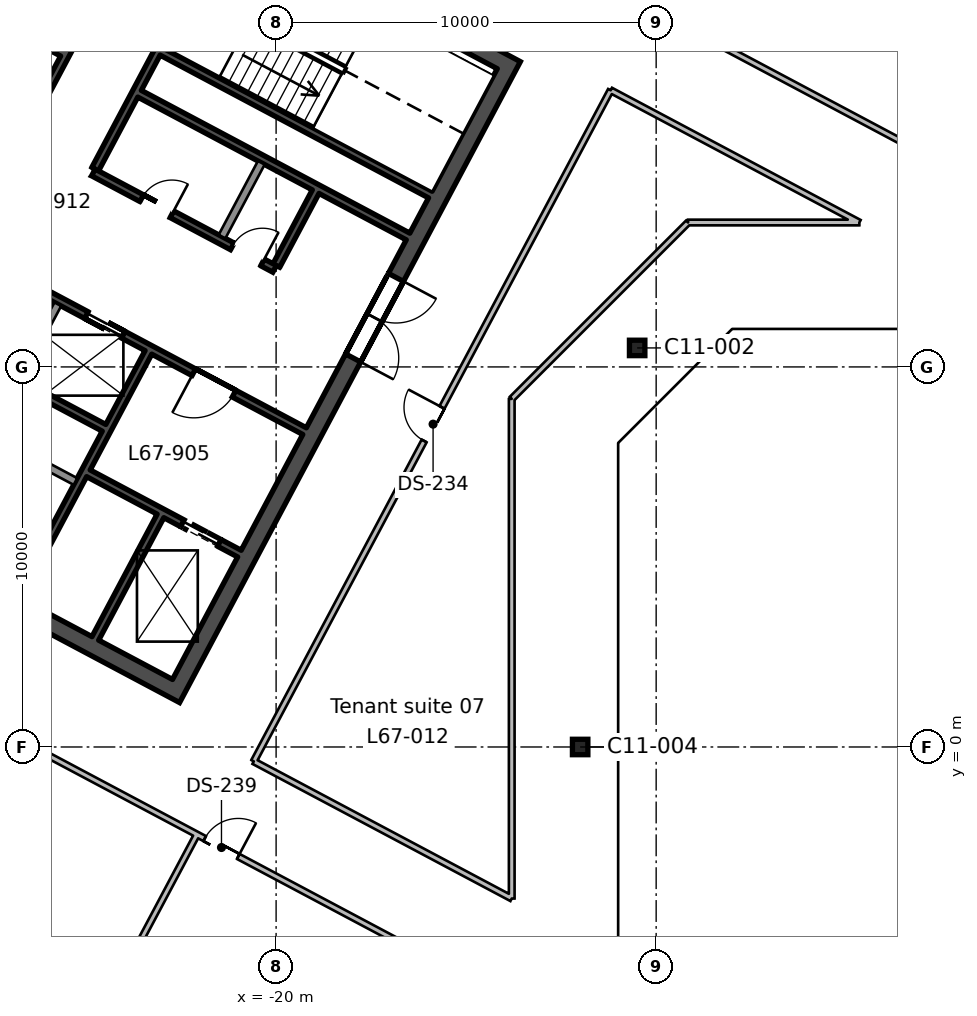
"""IFC4 building model, lengths in metres.
Left out: names, types, materials, properties, quantities, classifications, styles, units other than length and angle.
Written with IfcOpenShell. Run it as: python <this file> out.ifc"""

import sys

from ifc_helpers import new_model, si_unit, direction, frame, frame_2d, origin, origin_2d, place, context, subcontext, project, spatial, rectangle, hollow_rectangle, extrude, element, fill, save


model = new_model("IFC4")
c1 = context("Model", 3, precision=1e-05, world=origin(), true_north=direction((0.0, 1.0)))
c2 = subcontext(c1, "Body", "Model", "MODEL_VIEW")
j1 = project(units=[si_unit("LENGTHUNIT", "METRE"), si_unit("PLANEANGLEUNIT", "RADIAN")], contexts=[c1])
p1 = place(None, origin())
s1 = spatial("IfcSite", under=j1, at=p1, CompositionType="ELEMENT")
p2 = place(p1, origin())
s2 = spatial("IfcBuilding", under=s1, at=p2, CompositionType="ELEMENT")
p3 = place(p2, frame((0.0, 0.0, 297.0)))
s3 = spatial("IfcBuildingStorey", under=s2, at=p3, CompositionType="ELEMENT", Elevation=297.0)
for number, where, z_axis, x_axis in (
    (1, (-12.0, 0.0, 0.0), (0.0, 0.0, 1.0), (1.0, 0.0, 0.0)),
    (2, (-10.5, 10.5, 0.0), (0.0, 0.0, 1.0), (1.0, 0.0, 0.0)),
):
    element("IfcColumn", number, at=place(p3, frame(where, z_axis=z_axis, x_axis=x_axis)), inside=s3, PredefinedType="COLUMN", context=c2, shape_type="SweptSolid", body=[
        extrude(hollow_rectangle(XDim=0.406, YDim=0.406, WallThickness=0.009, InnerFilletRadius=0.004, OuterFilletRadius=0.013, at=origin_2d()), origin(), (0.0, 0.0, 1.0), 3.9),
    ])
p4 = place(p3, frame((-13.771, 18.138, 0.0), z_axis=(0.0, 0.0, 1.0), x_axis=(-0.469467968382, -0.882949504028, 0.0)))
e3 = element("IfcWall", 3, at=p4, inside=s3, PredefinedType="SHEAR", context=c2, shape_type="SweptSolid", body=[
    extrude(rectangle(XDim=19.1, YDim=0.45, at=frame_2d((9.55, 0.0))), origin(), (0.0, 0.0, 1.0), 3.9),
])
p5 = place(p4, frame((6.55, 0.0, 0.0)))
e4 = element("IfcOpeningElement", 4, at=p5, cuts=e3, PredefinedType="OPENING", context=c2, shape_type="SweptSolid", body=[
    extrude(rectangle(XDim=2.4, YDim=2.4, at=frame_2d((1.2, 1.2))), frame((0.0, 0.235, 0.0), z_axis=(0.0, -1.0, 0.0), x_axis=(1.0, 0.0, 0.0)), (0.0, 0.0, 1.0), 0.47),
])
p6 = place(p3, frame((-14.076, 18.045, 0.0), z_axis=(0.0, 0.0, 1.0), x_axis=(-0.882947755831, 0.46947125628, 0.0)))
e5 = element("IfcWall", 5, at=p6, inside=s3, PredefinedType="SHEAR", context=c2, shape_type="SweptSolid", body=[
    extrude(rectangle(XDim=20.2, YDim=0.45, at=frame_2d((10.1, 0.0))), origin(), (0.0, 0.0, 1.0), 3.9),
])
p7 = place(p3, frame((-22.832, 1.578, 0.0), z_axis=(0.0, 0.0, 1.0), x_axis=(-0.88294509198, 0.469476266226, 0.0)))
e6 = element("IfcWall", 6, at=p7, inside=s3, PredefinedType="SHEAR", context=c2, shape_type="SweptSolid", body=[
    extrude(rectangle(XDim=20.2, YDim=0.45, at=frame_2d((10.1, 0.0))), origin(), (0.0, 0.0, 1.0), 3.9),
])
p8 = place(p3, frame((-23.043, 6.08, 0.0), z_axis=(0.0, 0.0, 1.0), x_axis=(-0.469494272526, -0.882935517501, 0.0)))
e7 = element("IfcWall", 7, at=p8, inside=s3, PredefinedType="SHEAR", context=c2, shape_type="SweptSolid", body=[
    extrude(rectangle(XDim=3.65, YDim=0.2, at=frame_2d((1.825, 0.0))), origin(), (0.0, 0.0, 1.0), 3.9),
])
p9 = place(p3, frame((-18.96, 14.611, 0.0), z_axis=(0.0, 0.0, 1.0), x_axis=(-0.4694473164, -0.882960484464, 0.0)))
e8 = element("IfcWall", 8, at=p9, inside=s3, PredefinedType="SHEAR", context=c2, shape_type="SweptSolid", body=[
    extrude(rectangle(XDim=2.2, YDim=0.2, at=frame_2d((1.1, 0.0))), origin(), (0.0, 0.0, 1.0), 3.9),
])
p10 = place(p3, frame((-20.39, 15.372, 0.0), z_axis=(0.0, 0.0, 1.0), x_axis=(-0.4694473164, -0.882960484464, 0.0)))
e9 = element("IfcWall", 9, at=p10, inside=s3, PredefinedType="SOLIDWALL", context=c2, shape_type="SweptSolid", body=[
    extrude(rectangle(XDim=2.2, YDim=0.2, at=frame_2d((1.1, 0.0))), origin(), (0.0, 0.0, 1.0), 3.9),
])
p11 = place(p3, frame((-23.36, 10.382, 0.0), z_axis=(0.0, 0.0, 1.0), x_axis=(-0.469480409012, -0.88294288918, 0.0)))
e10 = element("IfcWall", 10, at=p11, inside=s3, PredefinedType="SHEAR", context=c2, shape_type="SweptSolid", body=[
    extrude(rectangle(XDim=7.3, YDim=0.2, at=frame_2d((3.65, 0.0))), origin(), (0.0, 0.0, 1.0), 3.9),
])
p12 = place(p3, frame((-25.744, 11.65, 0.0), z_axis=(0.0, 0.0, 1.0), x_axis=(-0.469487830541, -0.882938942948, 0.0)))
e11 = element("IfcWall", 11, at=p12, inside=s3, PredefinedType="SOLIDWALL", context=c2, shape_type="SweptSolid", body=[
    extrude(rectangle(XDim=2.2, YDim=0.2, at=frame_2d((1.1, 0.0))), origin(), (0.0, 0.0, 1.0), 3.9),
])
p13 = place(p3, frame((-21.333, 21.649, 0.0), z_axis=(0.0, 0.0, 1.0), x_axis=(-0.469494272526, -0.882935517501, 0.0)))
e12 = element("IfcWall", 12, at=p13, inside=s3, PredefinedType="SHEAR", context=c2, shape_type="SweptSolid", body=[
    extrude(rectangle(XDim=7.3, YDim=0.2, at=frame_2d((3.65, 0.0))), origin(), (0.0, 0.0, 1.0), 3.9),
])
p14 = place(p13, frame((1.3, 0.0, 0.0)))
e13 = element("IfcOpeningElement", 13, at=p14, cuts=e12, PredefinedType="OPENING", context=c2, shape_type="SweptSolid", body=[
    extrude(rectangle(XDim=1.2, YDim=2.1, at=frame_2d((0.6, 1.05))), frame((0.0, 0.11, 0.0), z_axis=(0.0, -1.0, 0.0), x_axis=(1.0, 0.0, 0.0)), (0.0, 0.0, 1.0), 0.22),
])
p15 = place(p3, frame((-23.188, 22.635, 0.0), z_axis=(0.0, 0.0, 1.0), x_axis=(-0.469454336211, -0.882956752176, 0.0)))
e14 = element("IfcWall", 14, at=p15, inside=s3, PredefinedType="SHEAR", context=c2, shape_type="SweptSolid", body=[
    extrude(rectangle(XDim=7.3, YDim=0.2, at=frame_2d((3.65, 0.0))), origin(), (0.0, 0.0, 1.0), 3.9),
])
p16 = place(p15, frame((0.4, 0.0, 0.0)))
e15 = element("IfcOpeningElement", 15, at=p16, cuts=e14, PredefinedType="OPENING", context=c2, shape_type="SweptSolid", body=[
    extrude(rectangle(XDim=0.9, YDim=2.1, at=frame_2d((0.45, 1.05))), frame((0.0, 0.11, 0.0), z_axis=(0.0, -1.0, 0.0), x_axis=(1.0, 0.0, 0.0)), (0.0, 0.0, 1.0), 0.22),
])
p17 = place(p15, frame((2.1, 0.0, 0.0)))
e16 = element("IfcOpeningElement", 16, at=p17, cuts=e14, PredefinedType="OPENING", context=c2, shape_type="SweptSolid", body=[
    extrude(rectangle(XDim=0.9, YDim=2.1, at=frame_2d((0.45, 1.05))), frame((0.0, 0.11, 0.0), z_axis=(0.0, -1.0, 0.0), x_axis=(1.0, 0.0, 0.0)), (0.0, 0.0, 1.0), 0.22),
])
p18 = place(p15, frame((3.75, 0.0, 0.0)))
e17 = element("IfcOpeningElement", 17, at=p18, cuts=e14, PredefinedType="OPENING", context=c2, shape_type="SweptSolid", body=[
    extrude(rectangle(XDim=0.9, YDim=2.1, at=frame_2d((0.45, 1.05))), frame((0.0, 0.11, 0.0), z_axis=(0.0, -1.0, 0.0), x_axis=(1.0, 0.0, 0.0)), (0.0, 0.0, 1.0), 0.22),
])
p19 = place(p3, frame((-15.942, 14.536, 0.0), z_axis=(0.0, 0.0, 1.0), x_axis=(-0.882946947542, 0.469472776449, 0.0)))
e18 = element("IfcWall", 18, at=p19, inside=s3, PredefinedType="SHEAR", context=c2, shape_type="SweptSolid", body=[
    extrude(rectangle(XDim=8.0, YDim=0.2, at=frame_2d((4.0, 0.0))), origin(), (0.0, 0.0, 1.0), 3.9),
])
p20 = place(p3, frame((-16.529, 13.432, 0.0), z_axis=(0.0, 0.0, 1.0), x_axis=(-0.88295287151, 0.469461634952, 0.0)))
e19 = element("IfcWall", 19, at=p20, inside=s3, PredefinedType="SHEAR", context=c2, shape_type="SweptSolid", body=[
    extrude(rectangle(XDim=8.0, YDim=0.2, at=frame_2d((4.0, 0.0))), origin(), (0.0, 0.0, 1.0), 3.9),
])
p21 = place(p3, frame((-25.623, 18.268, 0.0), z_axis=(0.0, 0.0, 1.0), x_axis=(-0.882953967957, 0.469459572775, 0.0)))
e20 = element("IfcWall", 20, at=p21, inside=s3, PredefinedType="SHEAR", context=c2, shape_type="SweptSolid", body=[
    extrude(rectangle(XDim=5.2, YDim=0.2, at=frame_2d((2.6, 0.0))), origin(), (0.0, 0.0, 1.0), 3.9),
])
p22 = place(p3, frame((-20.04, 12.581, 0.0), z_axis=(0.0, 0.0, 1.0), x_axis=(-0.882942972946, 0.469480251476, 0.0)))
e21 = element("IfcWall", 21, at=p22, inside=s3, PredefinedType="SHEAR", context=c2, shape_type="SweptSolid", body=[
    extrude(rectangle(XDim=5.4, YDim=0.2, at=frame_2d((2.7, 0.0))), origin(), (0.0, 0.0, 1.0), 3.9),
])
p23 = place(p22, frame((0.36, 0.0, 0.0)))
e22 = element("IfcOpeningElement", 22, at=p23, cuts=e21, PredefinedType="OPENING", context=c2, shape_type="SweptSolid", body=[
    extrude(rectangle(XDim=0.9, YDim=2.1, at=frame_2d((0.45, 1.05))), frame((0.0, 0.11, 0.0), z_axis=(0.0, -1.0, 0.0), x_axis=(1.0, 0.0, 0.0)), (0.0, 0.0, 1.0), 0.22),
])
p24 = place(p22, frame((3.06, 0.0, 0.0)))
e23 = element("IfcOpeningElement", 23, at=p24, cuts=e21, PredefinedType="OPENING", context=c2, shape_type="SweptSolid", body=[
    extrude(rectangle(XDim=0.9, YDim=2.1, at=frame_2d((0.45, 1.05))), frame((0.0, 0.11, 0.0), z_axis=(0.0, -1.0, 0.0), x_axis=(1.0, 0.0, 0.0)), (0.0, 0.0, 1.0), 0.22),
])
p25 = place(p3, frame((-19.252, 8.311, 0.0), z_axis=(0.0, 0.0, 1.0), x_axis=(-0.882955722218, 0.469456273365, 0.0)))
e24 = element("IfcWall", 24, at=p25, inside=s3, PredefinedType="SHEAR", context=c2, shape_type="SweptSolid", body=[
    extrude(rectangle(XDim=10.0, YDim=0.2, at=frame_2d((5.0, 0.0))), origin(), (0.0, 0.0, 1.0), 3.9),
])
p26 = place(p25, frame((2.1, 0.0, 0.0)))
e25 = element("IfcOpeningElement", 25, at=p26, cuts=e24, PredefinedType="OPENING", context=c2, shape_type="SweptSolid", body=[
    extrude(rectangle(XDim=1.2, YDim=2.1, at=frame_2d((0.6, 1.05))), frame((0.0, 0.11, 0.0), z_axis=(0.0, -1.0, 0.0), x_axis=(1.0, 0.0, 0.0)), (0.0, 0.0, 1.0), 0.22),
])
p27 = place(p25, frame((5.4, 0.0, 0.0)))
e26 = element("IfcOpeningElement", 26, at=p27, cuts=e24, PredefinedType="OPENING", context=c2, shape_type="SweptSolid", body=[
    extrude(rectangle(XDim=1.1, YDim=2.1, at=frame_2d((0.55, 1.05))), frame((0.0, 0.11, 0.0), z_axis=(0.0, -1.0, 0.0), x_axis=(1.0, 0.0, 0.0)), (0.0, 0.0, 1.0), 0.22),
])
p28 = place(p25, frame((8.1, 0.0, 0.0)))
e27 = element("IfcOpeningElement", 27, at=p28, cuts=e24, PredefinedType="OPENING", context=c2, shape_type="SweptSolid", body=[
    extrude(rectangle(XDim=1.1, YDim=2.1, at=frame_2d((0.55, 1.05))), frame((0.0, 0.11, 0.0), z_axis=(0.0, -1.0, 0.0), x_axis=(1.0, 0.0, 0.0)), (0.0, 0.0, 1.0), 0.22),
])
p29 = place(p3, frame((-24.528, 8.398, 0.0), z_axis=(0.0, 0.0, 1.0), x_axis=(-0.882953967957, 0.469459572775, 0.0)))
e28 = element("IfcWall", 28, at=p29, inside=s3, PredefinedType="SHEAR", context=c2, shape_type="SweptSolid", body=[
    extrude(rectangle(XDim=5.2, YDim=0.2, at=frame_2d((2.6, 0.0))), origin(), (0.0, 0.0, 1.0), 3.9),
])
p30 = place(p3, frame((-20.965, 5.088, 0.0), z_axis=(0.0, 0.0, 1.0), x_axis=(-0.882925986334, 0.469512196493, 0.0)))
e29 = element("IfcWall", 29, at=p30, inside=s3, PredefinedType="SHEAR", context=c2, shape_type="SweptSolid", body=[
    extrude(rectangle(XDim=4.5, YDim=0.2, at=frame_2d((2.25, 0.0))), origin(), (0.0, 0.0, 1.0), 3.9),
])
p31 = place(p30, frame((0.6, 0.0, 0.0)))
e30 = element("IfcOpeningElement", 30, at=p31, cuts=e29, PredefinedType="OPENING", context=c2, shape_type="SweptSolid", body=[
    extrude(rectangle(XDim=1.1, YDim=2.1, at=frame_2d((0.55, 1.05))), frame((0.0, 0.11, 0.0), z_axis=(0.0, -1.0, 0.0), x_axis=(1.0, 0.0, 0.0)), (0.0, 0.0, 1.0), 0.22),
])
p32 = place(p3, frame((-25.28, 6.986, 0.0), z_axis=(0.0, 0.0, 1.0), x_axis=(-0.882934506056, 0.469496174655, 0.0)))
e31 = element("IfcWall", 31, at=p32, inside=s3, PredefinedType="SOLIDWALL", context=c2, shape_type="SweptSolid", body=[
    extrude(rectangle(XDim=5.2, YDim=0.2, at=frame_2d((2.6, 0.0))), origin(), (0.0, 0.0, 1.0), 3.9),
])
p33 = place(p3, frame((-48.541, 39.854, 0.0), z_axis=(0.0, 0.0, 1.0), x_axis=(0.882945008423, -0.469476423372, 0.0)))
e32 = element("IfcWall", 32, at=p33, inside=s3, PredefinedType="PARTITIONING", context=c2, shape_type="SweptSolid", body=[
    extrude(rectangle(XDim=54.976, YDim=0.15, at=frame_2d((27.488, 0.0))), origin(), (0.0, 0.0, 1.0), 3.54),
])
p34 = place(p33, frame((39.35, 0.0, 0.0)))
e33 = element("IfcOpeningElement", 33, at=p34, cuts=e32, PredefinedType="OPENING", context=c2, shape_type="SweptSolid", body=[
    extrude(rectangle(XDim=1.0, YDim=2.1, at=frame_2d((0.5, 1.05))), frame((0.0, 0.085, 0.0), z_axis=(0.0, -1.0, 0.0), x_axis=(1.0, 0.0, 0.0)), (0.0, 0.0, 1.0), 0.17),
])
p35 = place(p33, frame((26.95, 0.0, 0.0)))
e34 = element("IfcOpeningElement", 34, at=p35, cuts=e32, PredefinedType="OPENING", context=c2, shape_type="SweptSolid", body=[
    extrude(rectangle(XDim=1.0, YDim=2.1, at=frame_2d((0.5, 1.05))), frame((0.0, 0.085, 0.0), z_axis=(0.0, -1.0, 0.0), x_axis=(1.0, 0.0, 0.0)), (0.0, 0.0, 1.0), 0.17),
])
p36 = place(p33, frame((21.049, 0.0, 0.0)))
e35 = element("IfcOpeningElement", 35, at=p36, cuts=e32, PredefinedType="OPENING", context=c2, shape_type="SweptSolid", body=[
    extrude(rectangle(XDim=1.0, YDim=2.1, at=frame_2d((0.5, 1.05))), frame((0.0, 0.085, 0.0), z_axis=(0.0, -1.0, 0.0), x_axis=(1.0, 0.0, 0.0)), (0.0, 0.0, 1.0), 0.17),
])
p37 = place(p33, frame((15.35, 0.0, 0.0)))
e36 = element("IfcOpeningElement", 36, at=p37, cuts=e32, PredefinedType="OPENING", context=c2, shape_type="SweptSolid", body=[
    extrude(rectangle(XDim=1.0, YDim=2.1, at=frame_2d((0.5, 1.05))), frame((0.0, 0.085, 0.0), z_axis=(0.0, -1.0, 0.0), x_axis=(1.0, 0.0, 0.0)), (0.0, 0.0, 1.0), 0.17),
])
p38 = place(p3, frame((-13.8, -6.706, 0.0), z_axis=(0.0, 0.0, 1.0), x_axis=(-0.882947286887, 0.469472138235, 0.0)))
e37 = element("IfcWall", 37, at=p38, inside=s3, PredefinedType="PARTITIONING", context=c2, shape_type="SweptSolid", body=[
    extrude(rectangle(XDim=36.571, YDim=0.15, at=frame_2d((18.285, 0.0))), origin(), (0.0, 0.0, 1.0), 3.54),
])
p39 = place(p38, frame((25.55, 0.0, 0.0)))
e38 = element("IfcOpeningElement", 38, at=p39, cuts=e37, PredefinedType="OPENING", context=c2, shape_type="SweptSolid", body=[
    extrude(rectangle(XDim=1.0, YDim=2.1, at=frame_2d((0.5, 1.05))), frame((0.0, 0.085, 0.0), z_axis=(0.0, -1.0, 0.0), x_axis=(1.0, 0.0, 0.0)), (0.0, 0.0, 1.0), 0.17),
])
p40 = place(p38, frame((17.75, 0.0, 0.0)))
e39 = element("IfcOpeningElement", 39, at=p40, cuts=e37, PredefinedType="OPENING", context=c2, shape_type="SweptSolid", body=[
    extrude(rectangle(XDim=1.0, YDim=2.1, at=frame_2d((0.5, 1.05))), frame((0.0, 0.085, 0.0), z_axis=(0.0, -1.0, 0.0), x_axis=(1.0, 0.0, 0.0)), (0.0, 0.0, 1.0), 0.17),
])
p41 = place(p38, frame((8.15, 0.0, 0.0)))
e40 = element("IfcOpeningElement", 40, at=p41, cuts=e37, PredefinedType="OPENING", context=c2, shape_type="SweptSolid", body=[
    extrude(rectangle(XDim=1.0, YDim=2.1, at=frame_2d((0.5, 1.05))), frame((0.0, 0.085, 0.0), z_axis=(0.0, -1.0, 0.0), x_axis=(1.0, 0.0, 0.0)), (0.0, 0.0, 1.0), 0.17),
])
p42 = place(p3, frame((-22.083, -2.302, 0.0), z_axis=(0.0, 0.0, 1.0), x_axis=(-0.469445946219, -0.882961212952, 0.0)))
e41 = element("IfcWall", 41, at=p42, inside=s3, PredefinedType="PARTITIONING", context=c2, shape_type="SweptSolid", body=[
    extrude(rectangle(XDim=8.8, YDim=0.15, at=frame_2d((4.4, 0.0))), origin(), (0.0, 0.0, 1.0), 3.54),
])
p43 = place(p3, frame((-20.588, -0.379, 0.0), z_axis=(0.0, 0.0, 1.0), x_axis=(0.469489882812, 0.882937851685, 0.0)))
e42 = element("IfcWall", 42, at=p43, inside=s3, PredefinedType="PARTITIONING", context=c2, shape_type="SweptSolid", body=[
    extrude(rectangle(XDim=20.0, YDim=0.15, at=frame_2d((10.0, 0.0))), origin(), (0.0, 0.0, 1.0), 3.54),
])
p44 = place(p43, frame((9.55, 0.0, 0.0)))
e43 = element("IfcOpeningElement", 43, at=p44, cuts=e42, PredefinedType="OPENING", context=c2, shape_type="SweptSolid", body=[
    extrude(rectangle(XDim=1.0, YDim=2.1, at=frame_2d((0.5, 1.05))), frame((0.0, 0.085, 0.0), z_axis=(0.0, -1.0, 0.0), x_axis=(1.0, 0.0, 0.0)), (0.0, 0.0, 1.0), 0.17),
])
p45 = place(p3, frame((-11.198, 17.28, 0.0), z_axis=(0.0, 0.0, 1.0), x_axis=(0.88294849999, -0.469469856717, 0.0)))
e44 = element("IfcWall", 44, at=p45, inside=s3, PredefinedType="PARTITIONING", context=c2, shape_type="SweptSolid", body=[
    extrude(rectangle(XDim=7.413, YDim=0.15, at=frame_2d((3.706, 0.0))), origin(), (0.0, 0.0, 1.0), 3.54),
])
p46 = place(p3, frame((-4.653, 13.8, 0.0), z_axis=(0.0, 0.0, 1.0), x_axis=(-1.0, 0.0, 0.0)))
e45 = element("IfcWall", 45, at=p46, inside=s3, PredefinedType="PARTITIONING", context=c2, shape_type="SweptSolid", body=[
    extrude(rectangle(XDim=4.507, YDim=0.15, at=frame_2d((2.253, 0.0))), origin(), (0.0, 0.0, 1.0), 3.54),
])
p47 = place(p3, frame((-9.16, 13.8, 0.0), z_axis=(0.0, 0.0, 1.0), x_axis=(-0.707106781187, -0.707106781187, 0.0)))
e46 = element("IfcWall", 46, at=p47, inside=s3, PredefinedType="PARTITIONING", context=c2, shape_type="SweptSolid", body=[
    extrude(rectangle(XDim=6.562, YDim=0.15, at=frame_2d((3.281, 0.0))), origin(), (0.0, 0.0, 1.0), 3.54),
])
p48 = place(p3, frame((-13.8, 9.16, 0.0), z_axis=(0.0, 0.0, 1.0), x_axis=(0.0, -1.0, 0.0)))
e47 = element("IfcWall", 47, at=p48, inside=s3, PredefinedType="PARTITIONING", context=c2, shape_type="SweptSolid", body=[
    extrude(rectangle(XDim=13.148, YDim=0.15, at=frame_2d((6.574, 0.0))), origin(), (0.0, 0.0, 1.0), 3.54),
])
p49 = place(p3, frame((-13.8, -3.988, 0.0), z_axis=(0.0, 0.0, 1.0), x_axis=(-0.882949137368, 0.469468657976, 0.0)))
e48 = element("IfcWall", 48, at=p49, inside=s3, PredefinedType="PARTITIONING", context=c2, shape_type="SweptSolid", body=[
    extrude(rectangle(XDim=7.688, YDim=0.15, at=frame_2d((3.844, 0.0))), origin(), (0.0, 0.0, 1.0), 3.54),
])
p50 = place(p5, origin())
e49 = element("IfcDoor", 49, at=p50, inside=s3, OperationType="DOUBLE_DOOR_SINGLE_SWING", PredefinedType="DOOR", context=c2, shape_type="SweptSolid", body=[
    extrude(rectangle(XDim=2.4, YDim=2.4, at=frame_2d((1.2, 1.2))), frame((0.0, 0.025, 0.0), z_axis=(0.0, -1.0, 0.0), x_axis=(1.0, 0.0, 0.0)), (0.0, 0.0, 1.0), 0.05),
])
fill(e4, e49)
p51 = place(p26, origin())
e50 = element("IfcDoor", 50, at=p51, inside=s3, OperationType="SINGLE_SWING_RIGHT", PredefinedType="DOOR", context=c2, shape_type="SweptSolid", body=[
    extrude(rectangle(XDim=1.2, YDim=2.1, at=frame_2d((0.6, 1.05))), frame((0.0, 0.025, 0.0), z_axis=(0.0, -1.0, 0.0), x_axis=(1.0, 0.0, 0.0)), (0.0, 0.0, 1.0), 0.05),
])
fill(e25, e50)
p52 = place(p23, frame((0.9, 0.0, 0.0), z_axis=(0.0, 0.0, 1.0), x_axis=(-1.0, 0.0, 0.0)))
e51 = element("IfcDoor", 51, at=p52, inside=s3, OperationType="SINGLE_SWING_RIGHT", PredefinedType="DOOR", context=c2, shape_type="SweptSolid", body=[
    extrude(rectangle(XDim=0.9, YDim=2.1, at=frame_2d((0.45, 1.05))), frame((0.0, 0.025, 0.0), z_axis=(0.0, -1.0, 0.0), x_axis=(1.0, 0.0, 0.0)), (0.0, 0.0, 1.0), 0.05),
])
fill(e22, e51)
p53 = place(p24, frame((0.9, 0.0, 0.0), z_axis=(0.0, 0.0, 1.0), x_axis=(-1.0, 0.0, 0.0)))
e52 = element("IfcDoor", 52, at=p53, inside=s3, OperationType="SINGLE_SWING_RIGHT", PredefinedType="DOOR", context=c2, shape_type="SweptSolid", body=[
    extrude(rectangle(XDim=0.9, YDim=2.1, at=frame_2d((0.45, 1.05))), frame((0.0, 0.025, 0.0), z_axis=(0.0, -1.0, 0.0), x_axis=(1.0, 0.0, 0.0)), (0.0, 0.0, 1.0), 0.05),
])
fill(e23, e52)
p54 = place(p27, origin())
e53 = element("IfcDoor", 53, at=p54, inside=s3, OperationType="DOUBLE_DOOR_SLIDING", PredefinedType="DOOR", context=c2, shape_type="SweptSolid", body=[
    extrude(rectangle(XDim=1.1, YDim=2.1, at=frame_2d((0.55, 1.05))), frame((0.0, 0.025, 0.0), z_axis=(0.0, -1.0, 0.0), x_axis=(1.0, 0.0, 0.0)), (0.0, 0.0, 1.0), 0.05),
])
fill(e26, e53)
p55 = place(p31, origin())
e54 = element("IfcDoor", 54, at=p55, inside=s3, OperationType="DOUBLE_DOOR_SLIDING", PredefinedType="DOOR", context=c2, shape_type="SweptSolid", body=[
    extrude(rectangle(XDim=1.1, YDim=2.1, at=frame_2d((0.55, 1.05))), frame((0.0, 0.025, 0.0), z_axis=(0.0, -1.0, 0.0), x_axis=(1.0, 0.0, 0.0)), (0.0, 0.0, 1.0), 0.05),
])
fill(e30, e54)
p56 = place(p44, origin())
e55 = element("IfcDoor", 55, at=p56, inside=s3, OperationType="SINGLE_SWING_RIGHT", PredefinedType="DOOR", context=c2, shape_type="SweptSolid", body=[
    extrude(rectangle(XDim=1.0, YDim=2.1, at=frame_2d((0.5, 1.05))), frame((0.0, 0.025, 0.0), z_axis=(0.0, -1.0, 0.0), x_axis=(1.0, 0.0, 0.0)), (0.0, 0.0, 1.0), 0.05),
])
fill(e43, e55)
p57 = place(p41, frame((1.0, 0.0, 0.0), z_axis=(0.0, 0.0, 1.0), x_axis=(-1.0, 0.0, 0.0)))
e56 = element("IfcDoor", 56, at=p57, inside=s3, OperationType="SINGLE_SWING_RIGHT", PredefinedType="DOOR", context=c2, shape_type="SweptSolid", body=[
    extrude(rectangle(XDim=1.0, YDim=2.1, at=frame_2d((0.5, 1.05))), frame((0.0, 0.025, 0.0), z_axis=(0.0, -1.0, 0.0), x_axis=(1.0, 0.0, 0.0)), (0.0, 0.0, 1.0), 0.05),
])
fill(e40, e56)
save(model, sys.argv[1])
